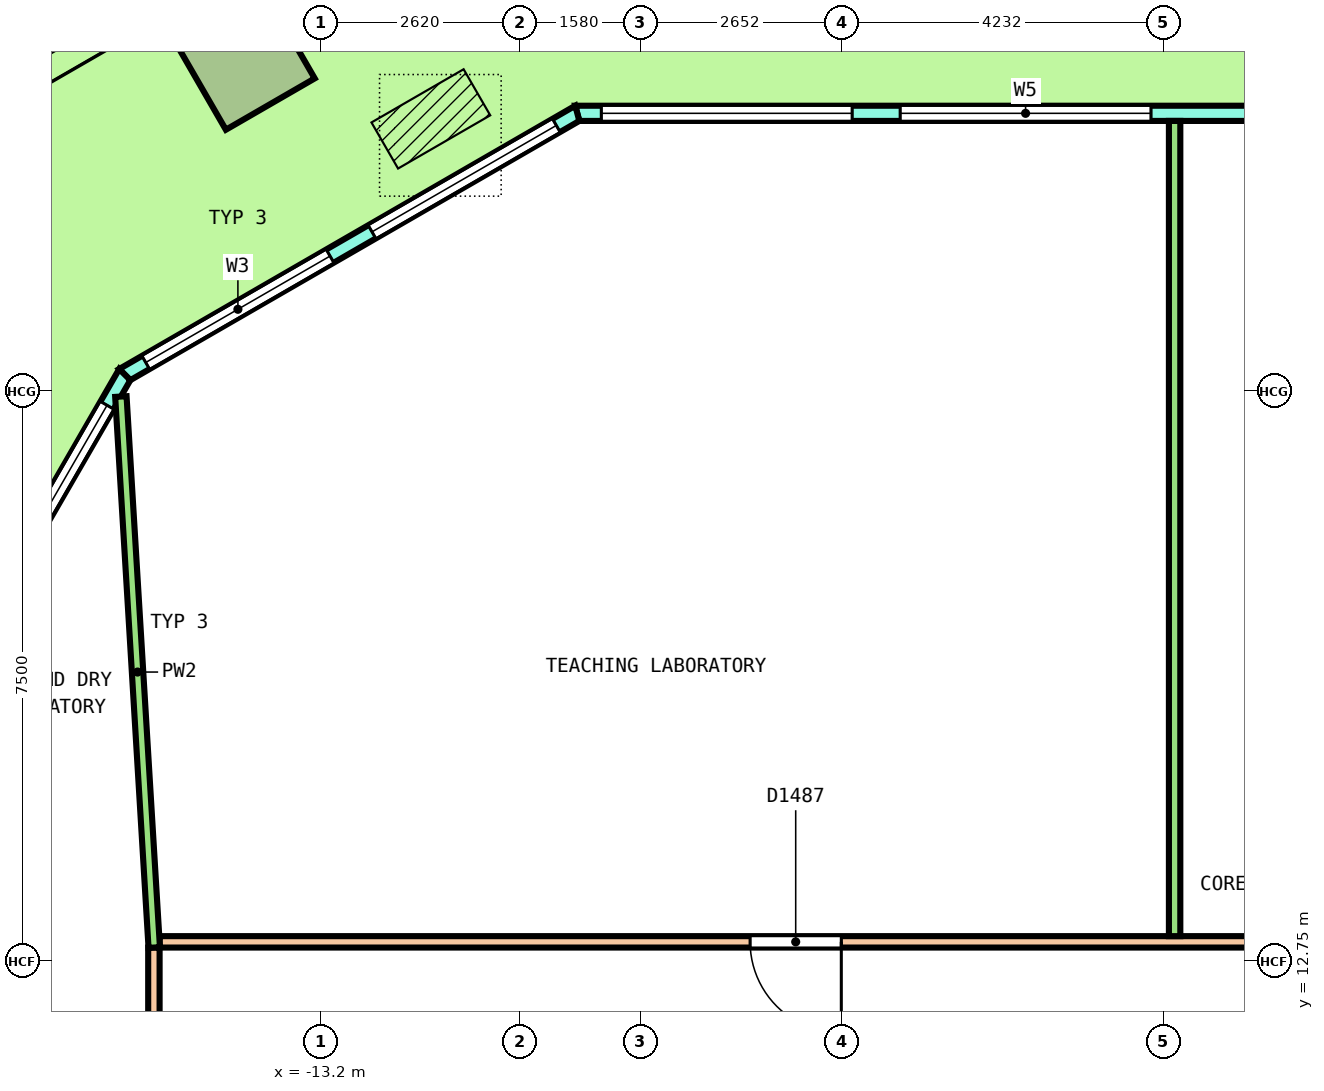
"""IFC4 building model, lengths in metres.
Left out: names, types, materials, properties, quantities, classifications, styles, units other than length and angle.
Written with IfcOpenShell. Run it as: python <this file> out.ifc"""

import sys

from ifc_helpers import new_model, si_unit, direction, frame, frame_2d, origin, origin_2d, place, context, subcontext, project, spatial, polyline, rectangle, outline, extrude, element, fill, save


model = new_model("IFC4")
c1 = context("Model", 3, precision=1e-05, world=origin(), true_north=direction((0.0, 1.0)))
c2 = subcontext(c1, "Body", "Model", "MODEL_VIEW")
j1 = project(units=[si_unit("LENGTHUNIT", "METRE"), si_unit("PLANEANGLEUNIT", "RADIAN")], contexts=[c1])
p1 = place(None, origin())
s1 = spatial("IfcSite", under=j1, at=p1, CompositionType="ELEMENT")
p2 = place(p1, origin())
s2 = spatial("IfcBuilding", under=s1, at=p2, CompositionType="ELEMENT")
p3 = place(p2, frame((0.0, 0.0, 80.8)))
s3 = spatial("IfcBuildingStorey", under=s2, at=p3, CompositionType="ELEMENT", Elevation=80.8)
p4 = place(p3, frame((-14.206, 24.606, 0.0), z_axis=(-0.036325398096, 0.0, 0.999340014936), x_axis=(-0.865311654478, -0.500246354177, -0.031453549198)))
e1 = element("IfcColumn", 1, at=p4, inside=s3, PredefinedType="COLUMN", context=c2, shape_type="SweptSolid", body=[
    extrude(rectangle(XDim=1.35, YDim=1.35, at=origin_2d()), origin(), (0.0, 0.0, 1.0), 4.053),
])
p5 = place(p3, frame((9.83, 23.9, 0.0), z_axis=(0.0, 0.0, 1.0), x_axis=(-1.0, 0.0, 0.0)))
e2 = element("IfcWall", 2, at=p5, inside=s3, PredefinedType="SOLIDWALL", context=c2, shape_type="SweptSolid", body=[
    extrude(outline(polyline([(-0.027, -0.1), (1.011, -0.1), (2.048, -0.1), (3.086, -0.1), (4.123, -0.1), (5.161, -0.1), (6.198, -0.1), (7.236, -0.1), (8.273, -0.1), (9.311, -0.1), (10.348, -0.1), (11.386, -0.1), (12.423, -0.1), (13.461, -0.1), (14.499, -0.1), (15.536, -0.1), (16.573, -0.1), (17.611, -0.1), (18.648, -0.1), (19.686, -0.1), (19.632, 0.1), (18.6, 0.1), (17.569, 0.1), (16.537, 0.1), (15.505, 0.1), (14.473, 0.1), (13.441, 0.1), (12.409, 0.1), (11.377, 0.1), (10.345, 0.1), (9.314, 0.1), (8.282, 0.1), (7.25, 0.1), (6.218, 0.1), (5.186, 0.1), (4.154, 0.1), (3.123, 0.1), (2.091, 0.1), (1.059, 0.1), (0.027, 0.1), (-0.027, -0.1)])), origin(), (0.0, 0.0, 1.0), 4.1),
])
p6 = place(p5, frame((0.316, 0.0, 0.1)))
e3 = element("IfcOpeningElement", 3, at=p6, cuts=e2, PredefinedType="OPENING", context=c2, shape_type="SweptSolid", body=[
    extrude(rectangle(XDim=3.3, YDim=2.9, at=frame_2d((1.65, 1.45))), frame((0.0, 0.11, 0.0), z_axis=(0.0, -1.0, 0.0), x_axis=(1.0, 0.0, 0.0)), (0.0, 0.0, 1.0), 0.22),
])
p7 = place(p5, frame((4.248, 0.0, 0.1)))
e4 = element("IfcOpeningElement", 4, at=p7, cuts=e2, PredefinedType="OPENING", context=c2, shape_type="SweptSolid", body=[
    extrude(rectangle(XDim=3.3, YDim=2.9, at=frame_2d((1.65, 1.45))), frame((0.0, 0.11, 0.0), z_axis=(0.0, -1.0, 0.0), x_axis=(1.0, 0.0, 0.0)), (0.0, 0.0, 1.0), 0.22),
])
p8 = place(p5, frame((8.93, 0.0, 0.0)))
e5 = element("IfcOpeningElement", 5, at=p8, cuts=e2, PredefinedType="OPENING", context=c2, shape_type="SweptSolid", body=[
    extrude(rectangle(XDim=1.8, YDim=2.4, at=frame_2d((0.9, 1.2))), frame((0.0, 0.11, 0.0), z_axis=(0.0, -1.0, 0.0), x_axis=(1.0, 0.0, 0.0)), (0.0, 0.0, 1.0), 0.22),
])
p9 = place(p5, frame((8.93, 0.0, 2.55)))
e6 = element("IfcOpeningElement", 6, at=p9, cuts=e2, PredefinedType="OPENING", context=c2, shape_type="SweptSolid", body=[
    extrude(rectangle(XDim=1.8, YDim=0.45, at=frame_2d((0.9, 0.225))), frame((0.0, 0.11, 0.0), z_axis=(0.0, -1.0, 0.0), x_axis=(1.0, 0.0, 0.0)), (0.0, 0.0, 1.0), 0.22),
])
p10 = place(p5, frame((12.112, 0.0, 0.1)))
e7 = element("IfcOpeningElement", 7, at=p10, cuts=e2, PredefinedType="OPENING", context=c2, shape_type="SweptSolid", body=[
    extrude(rectangle(XDim=3.3, YDim=2.9, at=frame_2d((1.65, 1.45))), frame((0.0, 0.11, 0.0), z_axis=(0.0, -1.0, 0.0), x_axis=(1.0, 0.0, 0.0)), (0.0, 0.0, 1.0), 0.22),
])
p11 = place(p5, frame((16.043, 0.0, 0.1)))
e8 = element("IfcOpeningElement", 8, at=p11, cuts=e2, PredefinedType="OPENING", context=c2, shape_type="SweptSolid", body=[
    extrude(rectangle(XDim=3.3, YDim=2.9, at=frame_2d((1.65, 1.45))), frame((0.0, 0.11, 0.0), z_axis=(0.0, -1.0, 0.0), x_axis=(1.0, 0.0, 0.0)), (0.0, 0.0, 1.0), 0.22),
])
p12 = place(p3, frame((-9.83, 23.9, 0.0), z_axis=(0.0, 0.0, 1.0), x_axis=(-0.866029458321, -0.49999297727, 0.0)))
e9 = element("IfcWall", 9, at=p12, inside=s3, PredefinedType="SOLIDWALL", context=c2, shape_type="SweptSolid", body=[
    extrude(outline(polyline([(-0.027, -0.1), (1.128, -0.1), (2.282, -0.1), (3.437, -0.1), (4.592, -0.1), (5.747, -0.1), (6.901, -0.1), (6.848, 0.1), (5.711, 0.1), (4.574, 0.1), (3.437, 0.1), (2.301, 0.1), (1.164, 0.1), (0.027, 0.1), (-0.027, -0.1)])), origin(), (0.0, 0.0, 1.0), 4.1),
])
p13 = place(p12, frame((0.319, 0.0, 0.1)))
e10 = element("IfcOpeningElement", 10, at=p13, cuts=e9, PredefinedType="OPENING", context=c2, shape_type="SweptSolid", body=[
    extrude(rectangle(XDim=2.8, YDim=2.9, at=frame_2d((1.4, 1.45))), frame((0.0, 0.11, 0.0), z_axis=(0.0, -1.0, 0.0), x_axis=(1.0, 0.0, 0.0)), (0.0, 0.0, 1.0), 0.22),
])
p14 = place(p12, frame((3.756, 0.0, 0.1)))
e11 = element("IfcOpeningElement", 11, at=p14, cuts=e9, PredefinedType="OPENING", context=c2, shape_type="SweptSolid", body=[
    extrude(rectangle(XDim=2.8, YDim=2.9, at=frame_2d((1.4, 1.45))), frame((0.0, 0.11, 0.0), z_axis=(0.0, -1.0, 0.0), x_axis=(1.0, 0.0, 0.0)), (0.0, 0.0, 1.0), 0.22),
])
p15 = place(p3, frame((-15.783, 20.463, 0.0), z_axis=(0.0, 0.0, 1.0), x_axis=(-0.499999083763, -0.866025932773, 0.0)))
e12 = element("IfcWall", 12, at=p15, inside=s3, PredefinedType="SOLIDWALL", context=c2, shape_type="SweptSolid", body=[
    extrude(outline(polyline([(-0.027, -0.1), (1.011, -0.1), (2.048, -0.1), (3.086, -0.1), (4.123, -0.1), (5.161, -0.1), (6.198, -0.1), (7.236, -0.1), (8.273, -0.1), (9.311, -0.1), (10.348, -0.1), (11.386, -0.1), (12.423, -0.1), (13.461, -0.1), (14.499, -0.1), (15.536, -0.1), (16.573, -0.1), (17.611, -0.1), (18.648, -0.1), (19.686, -0.1), (19.632, 0.1), (18.6, 0.1), (17.569, 0.1), (16.537, 0.1), (15.505, 0.1), (14.473, 0.1), (13.441, 0.1), (12.409, 0.1), (11.377, 0.1), (10.345, 0.1), (9.314, 0.1), (8.282, 0.1), (7.25, 0.1), (6.218, 0.1), (5.186, 0.1), (4.154, 0.1), (3.123, 0.1), (2.091, 0.1), (1.059, 0.1), (0.027, 0.1), (-0.027, -0.1)])), origin(), (0.0, 0.0, 1.0), 4.1),
])
p16 = place(p15, frame((0.466, 0.0, 0.1)))
e13 = element("IfcOpeningElement", 13, at=p16, cuts=e12, PredefinedType="OPENING", context=c2, shape_type="SweptSolid", body=[
    extrude(rectangle(XDim=3.0, YDim=2.9, at=frame_2d((1.5, 1.45))), frame((0.0, 0.11, 0.0), z_axis=(0.0, -1.0, 0.0), x_axis=(1.0, 0.0, 0.0)), (0.0, 0.0, 1.0), 0.22),
])
p17 = place(p15, frame((4.398, 0.0, 0.1)))
e14 = element("IfcOpeningElement", 14, at=p17, cuts=e12, PredefinedType="OPENING", context=c2, shape_type="SweptSolid", body=[
    extrude(rectangle(XDim=3.0, YDim=2.9, at=frame_2d((1.5, 1.45))), frame((0.0, 0.11, 0.0), z_axis=(0.0, -1.0, 0.0), x_axis=(1.0, 0.0, 0.0)), (0.0, 0.0, 1.0), 0.22),
])
p18 = place(p15, frame((8.93, 0.0, 0.0)))
e15 = element("IfcOpeningElement", 15, at=p18, cuts=e12, PredefinedType="OPENING", context=c2, shape_type="SweptSolid", body=[
    extrude(rectangle(XDim=1.8, YDim=2.4, at=frame_2d((0.9, 1.2))), frame((0.0, 0.11, 0.0), z_axis=(0.0, -1.0, 0.0), x_axis=(1.0, 0.0, 0.0)), (0.0, 0.0, 1.0), 0.22),
])
p19 = place(p15, frame((8.93, 0.0, 2.55)))
e16 = element("IfcOpeningElement", 16, at=p19, cuts=e12, PredefinedType="OPENING", context=c2, shape_type="SweptSolid", body=[
    extrude(rectangle(XDim=1.8, YDim=0.45, at=frame_2d((0.9, 0.225))), frame((0.0, 0.11, 0.0), z_axis=(0.0, -1.0, 0.0), x_axis=(1.0, 0.0, 0.0)), (0.0, 0.0, 1.0), 0.22),
])
p20 = place(p15, frame((12.261, 0.0, 0.1)))
e17 = element("IfcOpeningElement", 17, at=p20, cuts=e12, PredefinedType="OPENING", context=c2, shape_type="SweptSolid", body=[
    extrude(rectangle(XDim=3.0, YDim=2.9, at=frame_2d((1.5, 1.45))), frame((0.0, 0.11, 0.0), z_axis=(0.0, -1.0, 0.0), x_axis=(1.0, 0.0, 0.0)), (0.0, 0.0, 1.0), 0.22),
])
p21 = place(p15, frame((16.193, 0.0, 0.1)))
e18 = element("IfcOpeningElement", 18, at=p21, cuts=e12, PredefinedType="OPENING", context=c2, shape_type="SweptSolid", body=[
    extrude(rectangle(XDim=3.0, YDim=2.9, at=frame_2d((1.5, 1.45))), frame((0.0, 0.11, 0.0), z_axis=(0.0, -1.0, 0.0), x_axis=(1.0, 0.0, 0.0)), (0.0, 0.0, 1.0), 0.22),
])
p22 = place(p3, frame((-15.325, 13.0, 0.0), z_axis=(0.0, 0.0, 1.0), x_axis=(1.0, 0.0, 0.0)))
e19 = element("IfcWall", 19, at=p22, inside=s3, PredefinedType="PARTITIONING", context=c2, shape_type="SweptSolid", body=[
    extrude(rectangle(XDim=30.675, YDim=0.15, at=frame_2d((15.337, 0.0))), origin(), (0.0, 0.0, 1.0), 3.05),
])
p23 = place(p22, frame((28.953, 0.0, 0.0)))
e20 = element("IfcOpeningElement", 20, at=p23, cuts=e19, PredefinedType="OPENING", context=c2, shape_type="SweptSolid", body=[
    extrude(rectangle(XDim=1.0, YDim=2.1, at=frame_2d((0.5, 1.05))), frame((0.0, 0.085, 0.0), z_axis=(0.0, -1.0, 0.0), x_axis=(1.0, 0.0, 0.0)), (0.0, 0.0, 1.0), 0.17),
])
p24 = place(p22, frame((23.55, 0.0, 0.0)))
e21 = element("IfcOpeningElement", 21, at=p24, cuts=e19, PredefinedType="OPENING", context=c2, shape_type="SweptSolid", body=[
    extrude(rectangle(XDim=1.0, YDim=2.1, at=frame_2d((0.5, 1.05))), frame((0.0, 0.085, 0.0), z_axis=(0.0, -1.0, 0.0), x_axis=(1.0, 0.0, 0.0)), (0.0, 0.0, 1.0), 0.17),
])
p25 = place(p22, frame((7.769, 0.0, 0.0)))
e22 = element("IfcOpeningElement", 22, at=p25, cuts=e19, PredefinedType="OPENING", context=c2, shape_type="SweptSolid", body=[
    extrude(rectangle(XDim=1.2, YDim=2.1, at=frame_2d((0.6, 1.05))), frame((0.0, 0.085, 0.0), z_axis=(0.0, -1.0, 0.0), x_axis=(1.0, 0.0, 0.0)), (0.0, 0.0, 1.0), 0.17),
])
p26 = place(p3, frame((-15.4, -12.925, 0.0), z_axis=(0.0, 0.0, 1.0), x_axis=(0.0, 1.0, 0.0)))
e23 = element("IfcWall", 23, at=p26, inside=s3, PredefinedType="PARTITIONING", context=c2, shape_type="SweptSolid", body=[
    extrude(rectangle(XDim=25.85, YDim=0.15, at=frame_2d((12.925, 0.0))), origin(), (0.0, 0.0, 1.0), 3.05),
])
p27 = place(p26, frame((21.209, 0.0, 0.0)))
e24 = element("IfcOpeningElement", 24, at=p27, cuts=e23, PredefinedType="OPENING", context=c2, shape_type="SweptSolid", body=[
    extrude(rectangle(XDim=1.2, YDim=2.1, at=frame_2d((0.6, 1.05))), frame((0.0, 0.085, 0.0), z_axis=(0.0, -1.0, 0.0), x_axis=(1.0, 0.0, 0.0)), (0.0, 0.0, 1.0), 0.17),
])
p28 = place(p26, frame((15.289, 0.0, 0.0)))
e25 = element("IfcOpeningElement", 25, at=p28, cuts=e23, PredefinedType="OPENING", context=c2, shape_type="SweptSolid", body=[
    extrude(rectangle(XDim=1.2, YDim=2.1, at=frame_2d((0.6, 1.05))), frame((0.0, 0.085, 0.0), z_axis=(0.0, -1.0, 0.0), x_axis=(1.0, 0.0, 0.0)), (0.0, 0.0, 1.0), 0.17),
])
p29 = place(p26, frame((3.441, 0.0, 0.0)))
e26 = element("IfcOpeningElement", 26, at=p29, cuts=e23, PredefinedType="OPENING", context=c2, shape_type="SweptSolid", body=[
    extrude(rectangle(XDim=1.2, YDim=2.1, at=frame_2d((0.6, 1.05))), frame((0.0, 0.085, 0.0), z_axis=(0.0, -1.0, 0.0), x_axis=(1.0, 0.0, 0.0)), (0.0, 0.0, 1.0), 0.17),
])
p30 = place(p3, frame((-1.971, 13.075, 0.0), z_axis=(0.0, 0.0, 1.0), x_axis=(0.0, 1.0, 0.0)))
e27 = element("IfcWall", 27, at=p30, inside=s3, PredefinedType="PARTITIONING", context=c2, shape_type="SweptSolid", body=[
    extrude(rectangle(XDim=10.725, YDim=0.15, at=frame_2d((5.363, 0.0))), origin(), (0.0, 0.0, 1.0), 3.05),
])
p31 = place(p3, frame((-15.834, 20.174, 0.0), z_axis=(0.0, 0.0, 1.0), x_axis=(0.060446339426, -0.998171448224, 0.0)))
e28 = element("IfcWall", 28, at=p31, inside=s3, PredefinedType="PARTITIONING", context=c2, shape_type="SweptSolid", body=[
    extrude(rectangle(XDim=7.262, YDim=0.15, at=frame_2d((3.631, 0.0))), origin(), (0.0, 0.0, 1.0), 3.05),
])
p32 = place(p10, origin())
e29 = element("IfcWindow", 29, at=p32, inside=s3, PartitioningType="SINGLE_PANEL", PredefinedType="WINDOW", context=c2, shape_type="SweptSolid", body=[
    extrude(rectangle(XDim=3.3, YDim=2.9, at=frame_2d((1.65, 1.45))), frame((0.0, 0.03, 0.0), z_axis=(0.0, -1.0, 0.0), x_axis=(1.0, 0.0, 0.0)), (0.0, 0.0, 1.0), 0.06),
])
fill(e7, e29)
p33 = place(p11, origin())
e30 = element("IfcWindow", 30, at=p33, inside=s3, PartitioningType="SINGLE_PANEL", PredefinedType="WINDOW", context=c2, shape_type="SweptSolid", body=[
    extrude(rectangle(XDim=3.3, YDim=2.9, at=frame_2d((1.65, 1.45))), frame((0.0, 0.03, 0.0), z_axis=(0.0, -1.0, 0.0), x_axis=(1.0, 0.0, 0.0)), (0.0, 0.0, 1.0), 0.06),
])
fill(e8, e30)
p34 = place(p13, origin())
e31 = element("IfcWindow", 31, at=p34, inside=s3, PartitioningType="SINGLE_PANEL", PredefinedType="WINDOW", context=c2, shape_type="SweptSolid", body=[
    extrude(rectangle(XDim=2.8, YDim=2.9, at=frame_2d((1.4, 1.45))), frame((0.0, 0.03, 0.0), z_axis=(0.0, -1.0, 0.0), x_axis=(1.0, 0.0, 0.0)), (0.0, 0.0, 1.0), 0.06),
])
fill(e10, e31)
p35 = place(p14, origin())
e32 = element("IfcWindow", 32, at=p35, inside=s3, PartitioningType="SINGLE_PANEL", PredefinedType="WINDOW", context=c2, shape_type="SweptSolid", body=[
    extrude(rectangle(XDim=2.8, YDim=2.9, at=frame_2d((1.4, 1.45))), frame((0.0, 0.03, 0.0), z_axis=(0.0, -1.0, 0.0), x_axis=(1.0, 0.0, 0.0)), (0.0, 0.0, 1.0), 0.06),
])
fill(e11, e32)
p36 = place(p16, origin())
e33 = element("IfcWindow", 33, at=p36, inside=s3, PartitioningType="SINGLE_PANEL", PredefinedType="WINDOW", context=c2, shape_type="SweptSolid", body=[
    extrude(rectangle(XDim=3.0, YDim=2.9, at=frame_2d((1.5, 1.45))), frame((0.0, 0.03, 0.0), z_axis=(0.0, -1.0, 0.0), x_axis=(1.0, 0.0, 0.0)), (0.0, 0.0, 1.0), 0.06),
])
fill(e13, e33)
p37 = place(p25, origin())
e34 = element("IfcDoor", 34, at=p37, inside=s3, OperationType="DOUBLE_DOOR_SINGLE_SWING", PredefinedType="DOOR", context=c2, shape_type="SweptSolid", body=[
    extrude(rectangle(XDim=1.2, YDim=2.1, at=frame_2d((0.6, 1.05))), frame((0.0, 0.025, 0.0), z_axis=(0.0, -1.0, 0.0), x_axis=(1.0, 0.0, 0.0)), (0.0, 0.0, 1.0), 0.05),
])
fill(e22, e34)
save(model, sys.argv[1])
